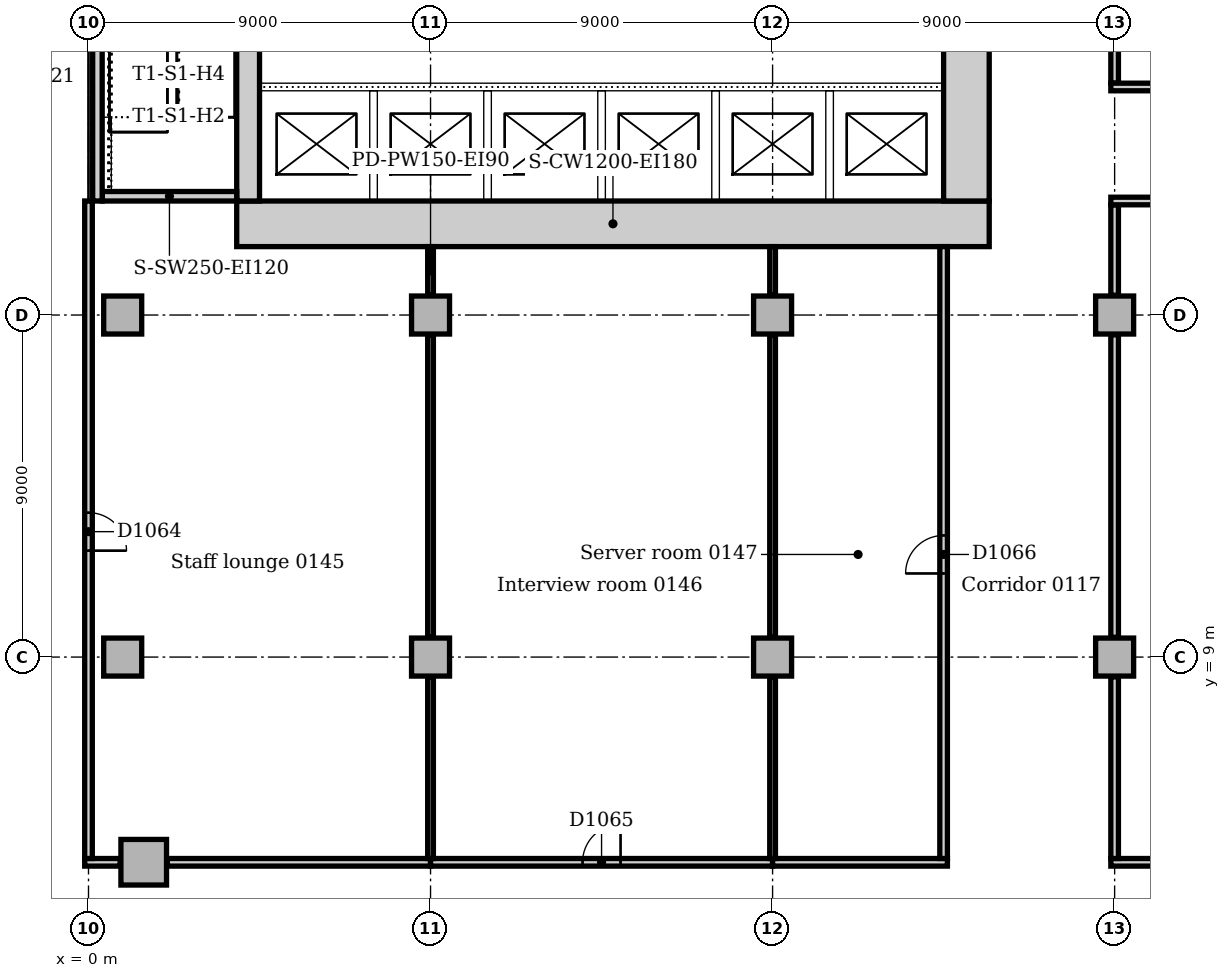
"""IFC4 building model, lengths in metres.
Left out: names, types, materials, properties, quantities, classifications, styles, units other than length and angle.
Written with IfcOpenShell. Run it as: python <this file> out.ifc"""

import sys

from ifc_helpers import new_model, si_unit, direction, frame, frame_2d, origin, origin_2d, place, context, subcontext, project, spatial, rectangle, extrude, element, fill, save


model = new_model("IFC4")
c1 = context("Model", 3, precision=1e-05, world=origin(), true_north=direction((0.0, 1.0)))
c2 = subcontext(c1, "Body", "Model", "MODEL_VIEW")
j1 = project(units=[si_unit("LENGTHUNIT", "METRE"), si_unit("PLANEANGLEUNIT", "RADIAN")], contexts=[c1])
p1 = place(None, origin())
s1 = spatial("IfcSite", under=j1, at=p1, CompositionType="ELEMENT")
p2 = place(p1, origin())
s2 = spatial("IfcBuilding", under=s1, at=p2, CompositionType="ELEMENT")
p3 = place(p2, frame((0.0, 0.0, 6.0)))
s3 = spatial("IfcBuildingStorey", under=s2, at=p3, CompositionType="ELEMENT", Elevation=6.0)
p4 = place(p3, frame((3.9, 20.4, 0.0), z_axis=(0.0, 0.0, 1.0), x_axis=(1.0, 0.0, 0.0)))
e1 = element("IfcWall", 1, at=p4, inside=s3, PredefinedType="SOLIDWALL", context=c2, shape_type="SweptSolid", body=[
    extrude(rectangle(XDim=19.8, YDim=1.2, at=frame_2d((9.9, 0.0))), origin(), (0.0, 0.0, 1.0), 5.0),
])
p5 = place(p3, frame((23.1, 21.0, 0.0), z_axis=(0.0, 0.0, 1.0), x_axis=(0.0, 1.0, 0.0)))
e2 = element("IfcWall", 2, at=p5, inside=s3, PredefinedType="SOLIDWALL", context=c2, shape_type="SweptSolid", body=[
    extrude(rectangle(XDim=10.5, YDim=1.2, at=frame_2d((5.25, 0.0))), origin(), (0.0, 0.0, 1.0), 5.0),
])
p6 = place(p5, frame((4.35, 0.0, 0.0)))
e3 = element("IfcOpeningElement", 3, at=p6, cuts=e2, PredefinedType="OPENING", context=c2, shape_type="SweptSolid", body=[
    extrude(rectangle(XDim=1.8, YDim=2.1, at=frame_2d((0.9, 1.05))), frame((0.0, 0.61, 0.0), z_axis=(0.0, -1.0, 0.0), x_axis=(1.0, 0.0, 0.0)), (0.0, 0.0, 1.0), 1.22),
])
p7 = place(p3, frame((4.2, 31.5, 0.0), z_axis=(0.0, 0.0, 1.0), x_axis=(0.0, -1.0, 0.0)))
e4 = element("IfcWall", 4, at=p7, inside=s3, PredefinedType="SOLIDWALL", context=c2, shape_type="SweptSolid", body=[
    extrude(rectangle(XDim=10.5, YDim=0.6, at=frame_2d((5.25, 0.0))), origin(), (0.0, 0.0, 1.0), 5.0),
])
p8 = place(p7, frame((4.25, 0.0, 0.0)))
e5 = element("IfcOpeningElement", 5, at=p8, cuts=e4, PredefinedType="OPENING", context=c2, shape_type="SweptSolid", body=[
    extrude(rectangle(XDim=1.0, YDim=2.1, at=frame_2d((0.5, 1.05))), frame((0.0, 0.31, 0.0), z_axis=(0.0, -1.0, 0.0), x_axis=(1.0, 0.0, 0.0)), (0.0, 0.0, 1.0), 0.62),
])
p9 = place(p3, frame((0.36, 21.125, 0.0), z_axis=(0.0, 0.0, 1.0), x_axis=(1.0, 0.0, 0.0)))
e6 = element("IfcWall", 6, at=p9, inside=s3, PredefinedType="SOLIDWALL", context=c2, shape_type="SweptSolid", body=[
    extrude(rectangle(XDim=3.54, YDim=0.25, at=frame_2d((1.77, 0.0))), origin(), (0.0, 0.0, 1.0), 5.0),
])
p10 = place(p3, frame((0.235, 21.0, 0.0), z_axis=(0.0, 0.0, 1.0), x_axis=(0.0, 1.0, 0.0)))
e7 = element("IfcWall", 7, at=p10, inside=s3, PredefinedType="SOLIDWALL", context=c2, shape_type="SweptSolid", body=[
    extrude(rectangle(XDim=21.0, YDim=0.25, at=frame_2d((10.5, 0.0))), origin(), (0.0, 0.0, 1.0), 5.0),
])
p11 = place(p3, frame((1.453, 3.602, 0.0), z_axis=(0.0, 0.0, 1.0), x_axis=(1.0, 0.0, 0.0)))
e8 = element("IfcColumn", 8, at=p11, inside=s3, PredefinedType="COLUMN", context=c2, shape_type="SweptSolid", body=[
    extrude(rectangle(XDim=1.2, YDim=1.2, at=origin_2d()), origin(), (0.0, 0.0, 1.0), 4.7),
])
for number, where, z_axis, x_axis in (
    (9, (0.9, 9.0, 0.0), (0.0, 0.0, 1.0), (1.0, 0.0, 0.0)),
    (10, (0.9, 18.0, 0.0), (0.0, 0.0, 1.0), (1.0, 0.0, 0.0)),
    (11, (9.0, 9.0, 0.0), (0.0, 0.0, 1.0), (1.0, 0.0, 0.0)),
    (12, (9.0, 18.0, 0.0), (0.0, 0.0, 1.0), (1.0, 0.0, 0.0)),
    (13, (18.0, 9.0, 0.0), (0.0, 0.0, 1.0), (1.0, 0.0, 0.0)),
    (14, (18.0, 18.0, 0.0), (0.0, 0.0, 1.0), (1.0, 0.0, 0.0)),
    (15, (27.0, 9.0, 0.0), (0.0, 0.0, 1.0), (1.0, 0.0, 0.0)),
    (16, (27.0, 18.0, 0.0), (0.0, 0.0, 1.0), (1.0, 0.0, 0.0)),
):
    element("IfcColumn", number, at=place(p3, frame(where, z_axis=z_axis, x_axis=x_axis)), inside=s3, PredefinedType="COLUMN", context=c2, shape_type="SweptSolid", body=[
        extrude(rectangle(XDim=1.0, YDim=1.0, at=origin_2d()), origin(), (0.0, 0.0, 1.0), 4.7),
    ])
p12 = place(p3, frame((-0.1, 3.6, 0.0), z_axis=(0.0, 0.0, 1.0), x_axis=(1.0, 0.0, 0.0)))
e17 = element("IfcWall", 17, at=p12, inside=s3, PredefinedType="PARTITIONING", context=c2, shape_type="SweptSolid", body=[
    extrude(rectangle(XDim=0.933, YDim=0.2, at=frame_2d((0.467, 0.0))), origin(), (0.0, 0.0, 1.0), 4.7),
])
p13 = place(p3, frame((2.073, 3.6, 0.0), z_axis=(0.0, 0.0, 1.0), x_axis=(1.0, 0.0, 0.0)))
e18 = element("IfcWall", 18, at=p13, inside=s3, PredefinedType="PARTITIONING", context=c2, shape_type="SweptSolid", body=[
    extrude(rectangle(XDim=6.927, YDim=0.2, at=frame_2d((3.463, 0.0))), origin(), (0.0, 0.0, 1.0), 4.7),
])
p14 = place(p3, frame((9.0, 3.6, 0.0), z_axis=(0.0, 0.0, 1.0), x_axis=(1.0, 0.0, 0.0)))
e19 = element("IfcWall", 19, at=p14, inside=s3, PredefinedType="PARTITIONING", context=c2, shape_type="SweptSolid", body=[
    extrude(rectangle(XDim=9.0, YDim=0.2, at=frame_2d((4.5, 0.0))), origin(), (0.0, 0.0, 1.0), 4.7),
])
p15 = place(p14, frame((4.0, 0.0, 0.0)))
e20 = element("IfcOpeningElement", 20, at=p15, cuts=e19, PredefinedType="OPENING", context=c2, shape_type="SweptSolid", body=[
    extrude(rectangle(XDim=1.0, YDim=2.1, at=frame_2d((0.5, 1.05))), frame((0.0, 0.11, 0.0), z_axis=(0.0, -1.0, 0.0), x_axis=(1.0, 0.0, 0.0)), (0.0, 0.0, 1.0), 0.22),
])
p16 = place(p3, frame((18.0, 3.6, 0.0), z_axis=(0.0, 0.0, 1.0), x_axis=(1.0, 0.0, 0.0)))
e21 = element("IfcWall", 21, at=p16, inside=s3, PredefinedType="PARTITIONING", context=c2, shape_type="SweptSolid", body=[
    extrude(rectangle(XDim=4.6, YDim=0.2, at=frame_2d((2.3, 0.0))), origin(), (0.0, 0.0, 1.0), 4.7),
])
p17 = place(p3, frame((26.9, 3.6, 0.0), z_axis=(0.0, 0.0, 1.0), x_axis=(1.0, 0.0, 0.0)))
e22 = element("IfcWall", 22, at=p17, inside=s3, PredefinedType="PARTITIONING", context=c2, shape_type="SweptSolid", body=[
    extrude(rectangle(XDim=9.1, YDim=0.2, at=frame_2d((4.55, 0.0))), origin(), (0.0, 0.0, 1.0), 4.7),
])
p18 = place(p3, frame((22.5, 3.7, 0.0), z_axis=(0.0, 0.0, 1.0), x_axis=(0.0, 1.0, 0.0)))
e23 = element("IfcWall", 23, at=p18, inside=s3, PredefinedType="PARTITIONING", context=c2, shape_type="SweptSolid", body=[
    extrude(rectangle(XDim=16.1, YDim=0.2, at=frame_2d((8.05, 0.0))), origin(), (0.0, 0.0, 1.0), 4.7),
])
p19 = place(p18, frame((7.5, 0.0, 0.0)))
e24 = element("IfcOpeningElement", 24, at=p19, cuts=e23, PredefinedType="OPENING", context=c2, shape_type="SweptSolid", body=[
    extrude(rectangle(XDim=1.0, YDim=2.1, at=frame_2d((0.5, 1.05))), frame((0.0, 0.11, 0.0), z_axis=(0.0, -1.0, 0.0), x_axis=(1.0, 0.0, 0.0)), (0.0, 0.0, 1.0), 0.22),
])
p20 = place(p3, frame((27.0, 3.7, 0.0), z_axis=(0.0, 0.0, 1.0), x_axis=(0.0, 1.0, 0.0)))
e25 = element("IfcWall", 25, at=p20, inside=s3, PredefinedType="PARTITIONING", context=c2, shape_type="SweptSolid", body=[
    extrude(rectangle(XDim=4.78, YDim=0.2, at=frame_2d((2.39, 0.0))), origin(), (0.0, 0.0, 1.0), 4.7),
])
p21 = place(p3, frame((27.0, 9.52, 0.0), z_axis=(0.0, 0.0, 1.0), x_axis=(0.0, 1.0, 0.0)))
e26 = element("IfcWall", 26, at=p21, inside=s3, PredefinedType="PARTITIONING", context=c2, shape_type="SweptSolid", body=[
    extrude(rectangle(XDim=7.96, YDim=0.2, at=frame_2d((3.98, 0.0))), origin(), (0.0, 0.0, 1.0), 4.7),
])
for number, where, z_axis, x_axis in (
    (27, (27.0, 18.52, 0.0), (0.0, 0.0, 1.0), (0.0, 1.0, 0.0)),
    (28, (27.0, 24.1, 0.0), (0.0, 0.0, 1.0), (0.0, 1.0, 0.0)),
):
    element("IfcWall", number, at=place(p3, frame(where, z_axis=z_axis, x_axis=x_axis)), inside=s3, PredefinedType="PARTITIONING", context=c2, shape_type="SweptSolid", body=[
        extrude(rectangle(XDim=2.38, YDim=0.2, at=frame_2d((1.19, 0.0))), origin(), (0.0, 0.0, 1.0), 4.7),
    ])
p22 = place(p3, frame((26.9, 21.0, 0.0), z_axis=(0.0, 0.0, 1.0), x_axis=(1.0, 0.0, 0.0)))
e29 = element("IfcWall", 29, at=p22, inside=s3, PredefinedType="PARTITIONING", context=c2, shape_type="SweptSolid", body=[
    extrude(rectangle(XDim=9.1, YDim=0.2, at=frame_2d((4.55, 0.0))), origin(), (0.0, 0.0, 1.0), 4.7),
])
p23 = place(p3, frame((26.9, 24.0, 0.0), z_axis=(0.0, 0.0, 1.0), x_axis=(1.0, 0.0, 0.0)))
e30 = element("IfcWall", 30, at=p23, inside=s3, PredefinedType="PARTITIONING", context=c2, shape_type="SweptSolid", body=[
    extrude(rectangle(XDim=3.1, YDim=0.2, at=frame_2d((1.55, 0.0))), origin(), (0.0, 0.0, 1.0), 4.7),
])
p24 = place(p3, frame((0.0, 3.7, 0.0), z_axis=(0.0, 0.0, 1.0), x_axis=(0.0, 1.0, 0.0)))
e31 = element("IfcWall", 31, at=p24, inside=s3, PredefinedType="PARTITIONING", context=c2, shape_type="SweptSolid", body=[
    extrude(rectangle(XDim=17.3, YDim=0.2, at=frame_2d((8.65, 0.0))), origin(), (0.0, 0.0, 1.0), 4.7),
])
p25 = place(p24, frame((8.1, 0.0, 0.0)))
e32 = element("IfcOpeningElement", 32, at=p25, cuts=e31, PredefinedType="OPENING", context=c2, shape_type="SweptSolid", body=[
    extrude(rectangle(XDim=1.0, YDim=2.1, at=frame_2d((0.5, 1.05))), frame((0.0, 0.11, 0.0), z_axis=(0.0, -1.0, 0.0), x_axis=(1.0, 0.0, 0.0)), (0.0, 0.0, 1.0), 0.22),
])
p26 = place(p3, frame((9.0, 3.7, 0.0), z_axis=(0.0, 0.0, 1.0), x_axis=(0.0, 1.0, 0.0)))
e33 = element("IfcWall", 33, at=p26, inside=s3, PredefinedType="PARTITIONING", context=c2, shape_type="SweptSolid", body=[
    extrude(rectangle(XDim=4.78, YDim=0.15, at=frame_2d((2.39, 0.0))), origin(), (0.0, 0.0, 1.0), 4.7),
])
p27 = place(p3, frame((9.0, 9.52, 0.0), z_axis=(0.0, 0.0, 1.0), x_axis=(0.0, 1.0, 0.0)))
e34 = element("IfcWall", 34, at=p27, inside=s3, PredefinedType="PARTITIONING", context=c2, shape_type="SweptSolid", body=[
    extrude(rectangle(XDim=7.96, YDim=0.15, at=frame_2d((3.98, 0.0))), origin(), (0.0, 0.0, 1.0), 4.7),
])
p28 = place(p3, frame((9.0, 18.52, 0.0), z_axis=(0.0, 0.0, 1.0), x_axis=(0.0, 1.0, 0.0)))
e35 = element("IfcWall", 35, at=p28, inside=s3, PredefinedType="PARTITIONING", context=c2, shape_type="SweptSolid", body=[
    extrude(rectangle(XDim=1.28, YDim=0.15, at=frame_2d((0.64, 0.0))), origin(), (0.0, 0.0, 1.0), 4.7),
])
p29 = place(p3, frame((18.0, 3.7, 0.0), z_axis=(0.0, 0.0, 1.0), x_axis=(0.0, 1.0, 0.0)))
e36 = element("IfcWall", 36, at=p29, inside=s3, PredefinedType="PARTITIONING", context=c2, shape_type="SweptSolid", body=[
    extrude(rectangle(XDim=4.78, YDim=0.15, at=frame_2d((2.39, 0.0))), origin(), (0.0, 0.0, 1.0), 4.7),
])
p30 = place(p3, frame((18.0, 9.52, 0.0), z_axis=(0.0, 0.0, 1.0), x_axis=(0.0, 1.0, 0.0)))
e37 = element("IfcWall", 37, at=p30, inside=s3, PredefinedType="PARTITIONING", context=c2, shape_type="SweptSolid", body=[
    extrude(rectangle(XDim=7.96, YDim=0.15, at=frame_2d((3.98, 0.0))), origin(), (0.0, 0.0, 1.0), 4.7),
])
p31 = place(p3, frame((18.0, 18.52, 0.0), z_axis=(0.0, 0.0, 1.0), x_axis=(0.0, 1.0, 0.0)))
e38 = element("IfcWall", 38, at=p31, inside=s3, PredefinedType="PARTITIONING", context=c2, shape_type="SweptSolid", body=[
    extrude(rectangle(XDim=1.28, YDim=0.15, at=frame_2d((0.64, 0.0))), origin(), (0.0, 0.0, 1.0), 4.7),
])
p32 = place(p3, frame((0.48, 21.25, 0.0), z_axis=(0.0, 0.0, 1.0), x_axis=(0.0, 1.0, 0.0)))
e39 = element("IfcWall", 39, at=p32, inside=s3, PredefinedType="STANDARD", context=c2, shape_type="SweptSolid", body=[
    extrude(rectangle(XDim=1.955, YDim=0.24, at=frame_2d((0.978, 0.0))), origin(), (0.0, 0.0, 1.0), 5.0),
])
p33 = place(p3, frame((4.5, 24.0, 0.0), z_axis=(0.0, 0.0, 1.0), x_axis=(1.0, 0.0, 0.0)))
e40 = element("IfcWall", 40, at=p33, inside=s3, PredefinedType="PARTITIONING", context=c2, shape_type="SweptSolid", body=[
    extrude(rectangle(XDim=18.0, YDim=0.2, at=frame_2d((9.0, 0.0))), origin(), (0.0, 0.0, 1.0), 4.7),
])
p34 = place(p33, frame((0.95, 0.0, 0.0)))
e41 = element("IfcOpeningElement", 41, at=p34, cuts=e40, PredefinedType="OPENING", context=c2, shape_type="SweptSolid", body=[
    extrude(rectangle(XDim=1.1, YDim=2.1, at=frame_2d((0.55, 1.05))), frame((0.0, 0.11, 0.0), z_axis=(0.0, -1.0, 0.0), x_axis=(1.0, 0.0, 0.0)), (0.0, 0.0, 1.0), 0.22),
])
p35 = place(p33, frame((3.95, 0.0, 0.0)))
e42 = element("IfcOpeningElement", 42, at=p35, cuts=e40, PredefinedType="OPENING", context=c2, shape_type="SweptSolid", body=[
    extrude(rectangle(XDim=1.1, YDim=2.1, at=frame_2d((0.55, 1.05))), frame((0.0, 0.11, 0.0), z_axis=(0.0, -1.0, 0.0), x_axis=(1.0, 0.0, 0.0)), (0.0, 0.0, 1.0), 0.22),
])
p36 = place(p33, frame((6.95, 0.0, 0.0)))
e43 = element("IfcOpeningElement", 43, at=p36, cuts=e40, PredefinedType="OPENING", context=c2, shape_type="SweptSolid", body=[
    extrude(rectangle(XDim=1.1, YDim=2.1, at=frame_2d((0.55, 1.05))), frame((0.0, 0.11, 0.0), z_axis=(0.0, -1.0, 0.0), x_axis=(1.0, 0.0, 0.0)), (0.0, 0.0, 1.0), 0.22),
])
p37 = place(p33, frame((9.95, 0.0, 0.0)))
e44 = element("IfcOpeningElement", 44, at=p37, cuts=e40, PredefinedType="OPENING", context=c2, shape_type="SweptSolid", body=[
    extrude(rectangle(XDim=1.1, YDim=2.1, at=frame_2d((0.55, 1.05))), frame((0.0, 0.11, 0.0), z_axis=(0.0, -1.0, 0.0), x_axis=(1.0, 0.0, 0.0)), (0.0, 0.0, 1.0), 0.22),
])
p38 = place(p33, frame((12.95, 0.0, 0.0)))
e45 = element("IfcOpeningElement", 45, at=p38, cuts=e40, PredefinedType="OPENING", context=c2, shape_type="SweptSolid", body=[
    extrude(rectangle(XDim=1.1, YDim=2.1, at=frame_2d((0.55, 1.05))), frame((0.0, 0.11, 0.0), z_axis=(0.0, -1.0, 0.0), x_axis=(1.0, 0.0, 0.0)), (0.0, 0.0, 1.0), 0.22),
])
p39 = place(p33, frame((15.95, 0.0, 0.0)))
e46 = element("IfcOpeningElement", 46, at=p39, cuts=e40, PredefinedType="OPENING", context=c2, shape_type="SweptSolid", body=[
    extrude(rectangle(XDim=1.1, YDim=2.1, at=frame_2d((0.55, 1.05))), frame((0.0, 0.11, 0.0), z_axis=(0.0, -1.0, 0.0), x_axis=(1.0, 0.0, 0.0)), (0.0, 0.0, 1.0), 0.22),
])
for number, where, z_axis, x_axis in (
    (47, (7.5, 21.0, 0.0), (0.0, 0.0, 1.0), (0.0, 1.0, 0.0)),
    (48, (10.5, 21.0, 0.0), (0.0, 0.0, 1.0), (0.0, 1.0, 0.0)),
    (49, (13.5, 21.0, 0.0), (0.0, 0.0, 1.0), (0.0, 1.0, 0.0)),
    (50, (16.5, 21.0, 0.0), (0.0, 0.0, 1.0), (0.0, 1.0, 0.0)),
    (51, (19.5, 21.0, 0.0), (0.0, 0.0, 1.0), (0.0, 1.0, 0.0)),
):
    element("IfcWall", number, at=place(p3, frame(where, z_axis=z_axis, x_axis=x_axis)), inside=s3, PredefinedType="PARTITIONING", context=c2, shape_type="SweptSolid", body=[
        extrude(rectangle(XDim=2.9, YDim=0.2, at=frame_2d((1.45, 0.0))), origin(), (0.0, 0.0, 1.0), 4.7),
    ])
p40 = place(p25, frame((1.0, 0.0, 0.0), z_axis=(0.0, 0.0, 1.0), x_axis=(-1.0, 0.0, 0.0)))
e52 = element("IfcDoor", 52, at=p40, inside=s3, OperationType="SINGLE_SWING_RIGHT", PredefinedType="DOOR", context=c2, shape_type="SweptSolid", body=[
    extrude(rectangle(XDim=1.0, YDim=2.1, at=frame_2d((0.5, 1.05))), frame((0.0, 0.025, 0.0), z_axis=(0.0, -1.0, 0.0), x_axis=(1.0, 0.0, 0.0)), (0.0, 0.0, 1.0), 0.05),
])
fill(e32, e52)
p41 = place(p15, origin())
e53 = element("IfcDoor", 53, at=p41, inside=s3, OperationType="SINGLE_SWING_RIGHT", PredefinedType="DOOR", context=c2, shape_type="SweptSolid", body=[
    extrude(rectangle(XDim=1.0, YDim=2.1, at=frame_2d((0.5, 1.05))), frame((0.0, 0.025, 0.0), z_axis=(0.0, -1.0, 0.0), x_axis=(1.0, 0.0, 0.0)), (0.0, 0.0, 1.0), 0.05),
])
fill(e20, e53)
p42 = place(p19, origin())
e54 = element("IfcDoor", 54, at=p42, inside=s3, OperationType="SINGLE_SWING_LEFT", PredefinedType="DOOR", context=c2, shape_type="SweptSolid", body=[
    extrude(rectangle(XDim=1.0, YDim=2.1, at=frame_2d((0.5, 1.05))), frame((0.0, 0.025, 0.0), z_axis=(0.0, -1.0, 0.0), x_axis=(1.0, 0.0, 0.0)), (0.0, 0.0, 1.0), 0.05),
])
fill(e24, e54)
p43 = place(p34, origin())
e55 = element("IfcDoor", 55, at=p43, inside=s3, OperationType="SLIDING_TO_LEFT", PredefinedType="DOOR", context=c2, shape_type="SweptSolid", body=[
    extrude(rectangle(XDim=1.1, YDim=2.1, at=frame_2d((0.55, 1.05))), frame((0.0, 0.025, 0.0), z_axis=(0.0, -1.0, 0.0), x_axis=(1.0, 0.0, 0.0)), (0.0, 0.0, 1.0), 0.05),
])
fill(e41, e55)
p44 = place(p35, origin())
e56 = element("IfcDoor", 56, at=p44, inside=s3, OperationType="SLIDING_TO_LEFT", PredefinedType="DOOR", context=c2, shape_type="SweptSolid", body=[
    extrude(rectangle(XDim=1.1, YDim=2.1, at=frame_2d((0.55, 1.05))), frame((0.0, 0.025, 0.0), z_axis=(0.0, -1.0, 0.0), x_axis=(1.0, 0.0, 0.0)), (0.0, 0.0, 1.0), 0.05),
])
fill(e42, e56)
p45 = place(p36, origin())
e57 = element("IfcDoor", 57, at=p45, inside=s3, OperationType="SLIDING_TO_LEFT", PredefinedType="DOOR", context=c2, shape_type="SweptSolid", body=[
    extrude(rectangle(XDim=1.1, YDim=2.1, at=frame_2d((0.55, 1.05))), frame((0.0, 0.025, 0.0), z_axis=(0.0, -1.0, 0.0), x_axis=(1.0, 0.0, 0.0)), (0.0, 0.0, 1.0), 0.05),
])
fill(e43, e57)
p46 = place(p37, origin())
e58 = element("IfcDoor", 58, at=p46, inside=s3, OperationType="SLIDING_TO_LEFT", PredefinedType="DOOR", context=c2, shape_type="SweptSolid", body=[
    extrude(rectangle(XDim=1.1, YDim=2.1, at=frame_2d((0.55, 1.05))), frame((0.0, 0.025, 0.0), z_axis=(0.0, -1.0, 0.0), x_axis=(1.0, 0.0, 0.0)), (0.0, 0.0, 1.0), 0.05),
])
fill(e44, e58)
p47 = place(p38, origin())
e59 = element("IfcDoor", 59, at=p47, inside=s3, OperationType="SLIDING_TO_LEFT", PredefinedType="DOOR", context=c2, shape_type="SweptSolid", body=[
    extrude(rectangle(XDim=1.1, YDim=2.1, at=frame_2d((0.55, 1.05))), frame((0.0, 0.025, 0.0), z_axis=(0.0, -1.0, 0.0), x_axis=(1.0, 0.0, 0.0)), (0.0, 0.0, 1.0), 0.05),
])
fill(e45, e59)
p48 = place(p39, origin())
e60 = element("IfcDoor", 60, at=p48, inside=s3, OperationType="SLIDING_TO_LEFT", PredefinedType="DOOR", context=c2, shape_type="SweptSolid", body=[
    extrude(rectangle(XDim=1.1, YDim=2.1, at=frame_2d((0.55, 1.05))), frame((0.0, 0.025, 0.0), z_axis=(0.0, -1.0, 0.0), x_axis=(1.0, 0.0, 0.0)), (0.0, 0.0, 1.0), 0.05),
])
fill(e46, e60)
save(model, sys.argv[1])
